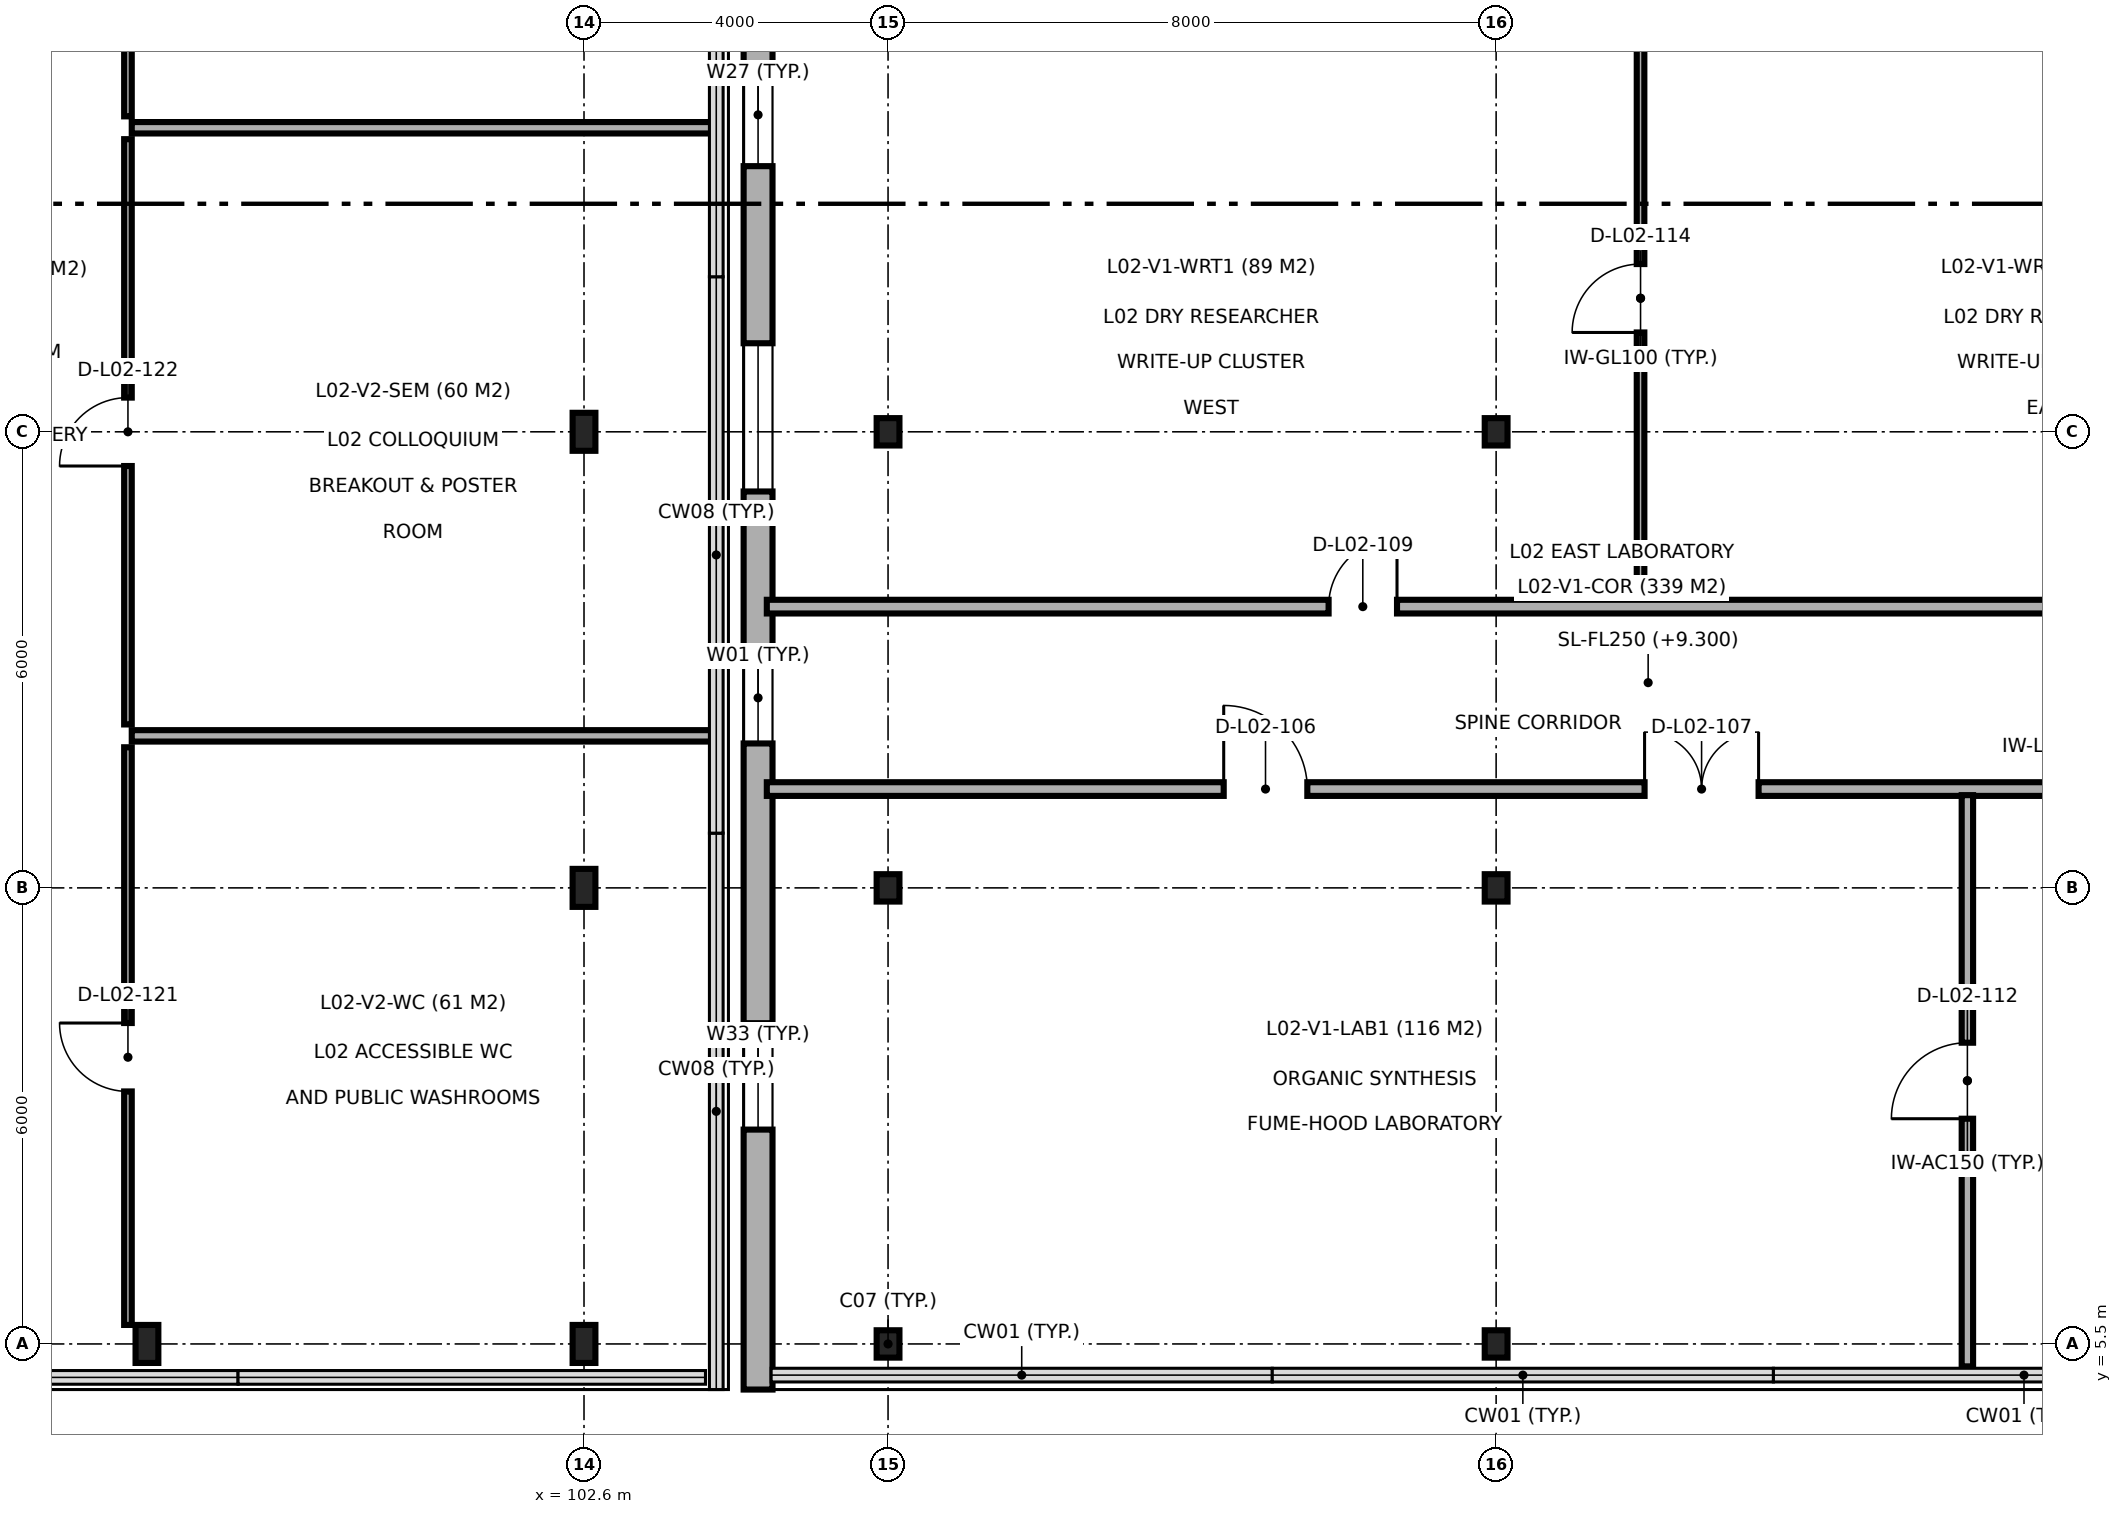
"""IFC4 building model, lengths in metres.
Left out: names, types, materials, properties, quantities, classifications, styles, units other than length and angle.
Written with IfcOpenShell. Run it as: python <this file> out.ifc"""

import sys

from ifc_helpers import new_model, si_unit, direction, frame, frame_2d, origin, origin_2d, place, context, subcontext, project, spatial, rectangle, i_section, extrude, element, fill, save


model = new_model("IFC4")
c1 = context("Model", 3, precision=1e-05, world=origin(), true_north=direction((0.0, 1.0)))
c2 = subcontext(c1, "Body", "Model", "MODEL_VIEW")
j1 = project(units=[si_unit("LENGTHUNIT", "METRE"), si_unit("PLANEANGLEUNIT", "RADIAN")], contexts=[c1])
p1 = place(None, origin())
s1 = spatial("IfcSite", under=j1, at=p1, CompositionType="ELEMENT")
p2 = place(p1, origin())
s2 = spatial("IfcBuilding", under=s1, at=p2, CompositionType="ELEMENT")
p3 = place(p2, frame((0.0, 0.0, 9.3)))
s3 = spatial("IfcBuildingStorey", under=s2, at=p3, CompositionType="ELEMENT", Elevation=9.3)
for number, where, z_axis, x_axis in (
    (1, (96.85, 5.5, 0.0), (0.0, 0.0, 1.0), (1.0, 0.0, 0.0)),
    (2, (102.6, 5.5, 0.0), (0.0, 0.0, 1.0), (1.0, 0.0, 0.0)),
    (3, (102.6, 11.5, 0.0), (0.0, 0.0, 1.0), (1.0, 0.0, 0.0)),
    (4, (102.6, 17.5, 0.0), (0.0, 0.0, 1.0), (1.0, 0.0, 0.0)),
):
    element("IfcColumn", number, at=place(p3, frame(where, z_axis=z_axis, x_axis=x_axis)), inside=s3, PredefinedType="COLUMN", context=c2, shape_type="SweptSolid", body=[
        extrude(i_section(OverallWidth=0.3, OverallDepth=0.5, WebThickness=0.014, FlangeThickness=0.028, FilletRadius=0.027, at=origin_2d()), origin(), (0.0, 0.0, 1.0), 4.5),
    ])
for number, where, z_axis, x_axis in (
    (5, (106.6, 5.5, 0.0), (0.0, 0.0, 1.0), (1.0, 0.0, 0.0)),
    (6, (106.6, 11.5, 0.0), (0.0, 0.0, 1.0), (1.0, 0.0, 0.0)),
    (7, (106.6, 17.5, 0.0), (0.0, 0.0, 1.0), (1.0, 0.0, 0.0)),
    (8, (114.6, 5.5, 0.0), (0.0, 0.0, 1.0), (1.0, 0.0, 0.0)),
    (9, (114.6, 11.5, 0.0), (0.0, 0.0, 1.0), (1.0, 0.0, 0.0)),
    (10, (114.6, 17.5, 0.0), (0.0, 0.0, 1.0), (1.0, 0.0, 0.0)),
):
    element("IfcColumn", number, at=place(p3, frame(where, z_axis=z_axis, x_axis=x_axis)), inside=s3, PredefinedType="COLUMN", context=c2, shape_type="SweptSolid", body=[
        extrude(i_section(OverallWidth=0.3, OverallDepth=0.36, WebThickness=0.012, FlangeThickness=0.022, FilletRadius=0.027, at=origin_2d()), origin(), (0.0, 0.0, 1.0), 4.5),
    ])
p4 = place(p3, frame((104.89, 23.5, 0.0), z_axis=(0.0, 0.0, 1.0), x_axis=(0.0, -1.0, 0.0)))
e11 = element("IfcWall", 11, at=p4, inside=s3, PredefinedType="SOLIDWALL", context=c2, shape_type="SweptSolid", body=[
    extrude(rectangle(XDim=18.6, YDim=0.38, at=frame_2d((9.3, 0.0))), origin(), (0.0, 0.0, 1.0), 4.25),
])
p5 = place(p4, frame((1.155, 0.0, 0.9)))
e12 = element("IfcOpeningElement", 12, at=p5, cuts=e11, PredefinedType="OPENING", context=c2, shape_type="SweptSolid", body=[
    extrude(rectangle(XDim=1.35, YDim=1.95, at=frame_2d((0.675, 0.975))), frame((0.0, 0.2, 0.0), z_axis=(0.0, -1.0, 0.0), x_axis=(1.0, 0.0, 0.0)), (0.0, 0.0, 1.0), 0.4),
])
p6 = place(p4, frame((4.835, 0.0, 0.9)))
e13 = element("IfcOpeningElement", 13, at=p6, cuts=e11, PredefinedType="OPENING", context=c2, shape_type="SweptSolid", body=[
    extrude(rectangle(XDim=1.95, YDim=1.95, at=frame_2d((0.975, 0.975))), frame((0.0, 0.2, 0.0), z_axis=(0.0, -1.0, 0.0), x_axis=(1.0, 0.0, 0.0)), (0.0, 0.0, 1.0), 0.4),
])
p7 = place(p4, frame((8.9, 0.0, 0.9)))
e14 = element("IfcOpeningElement", 14, at=p7, cuts=e11, PredefinedType="OPENING", context=c2, shape_type="SweptSolid", body=[
    extrude(rectangle(XDim=1.2, YDim=1.8, at=frame_2d((0.6, 0.9))), frame((0.0, 0.2, 0.0), z_axis=(0.0, -1.0, 0.0), x_axis=(1.0, 0.0, 0.0)), (0.0, 0.0, 1.0), 0.4),
])
p8 = place(p4, frame((13.78, 0.0, 0.9)))
e15 = element("IfcOpeningElement", 15, at=p8, cuts=e11, PredefinedType="OPENING", context=c2, shape_type="SweptSolid", body=[
    extrude(rectangle(XDim=1.4, YDim=1.65, at=frame_2d((0.7, 0.825))), frame((0.0, 0.2, 0.0), z_axis=(0.0, -1.0, 0.0), x_axis=(1.0, 0.0, 0.0)), (0.0, 0.0, 1.0), 0.4),
])
p9 = place(p3, frame((105.005, 12.8, 0.0), z_axis=(0.0, 0.0, 1.0), x_axis=(1.0, 0.0, 0.0)))
e16 = element("IfcWall", 16, at=p9, inside=s3, PredefinedType="PARTITIONING", context=c2, shape_type="SweptSolid", body=[
    extrude(rectangle(XDim=34.495, YDim=0.18, at=frame_2d((17.248, 0.0))), origin(), (0.0, 0.0, 1.0), 4.25),
])
p10 = place(p9, frame((6.011, 0.0, 0.0)))
e17 = element("IfcOpeningElement", 17, at=p10, cuts=e16, PredefinedType="OPENING", context=c2, shape_type="SweptSolid", body=[
    extrude(rectangle(XDim=1.1, YDim=2.15, at=frame_2d((0.55, 1.075))), frame((0.0, 0.1, 0.0), z_axis=(0.0, -1.0, 0.0), x_axis=(1.0, 0.0, 0.0)), (0.0, 0.0, 1.0), 0.2),
])
p11 = place(p9, frame((11.548, 0.0, 0.0)))
e18 = element("IfcOpeningElement", 18, at=p11, cuts=e16, PredefinedType="OPENING", context=c2, shape_type="SweptSolid", body=[
    extrude(rectangle(XDim=1.5, YDim=2.2, at=frame_2d((0.75, 1.1))), frame((0.0, 0.1, 0.0), z_axis=(0.0, -1.0, 0.0), x_axis=(1.0, 0.0, 0.0)), (0.0, 0.0, 1.0), 0.2),
])
p12 = place(p9, frame((27.548, 0.0, 0.0)))
e19 = element("IfcOpeningElement", 19, at=p12, cuts=e16, PredefinedType="OPENING", context=c2, shape_type="SweptSolid", body=[
    extrude(rectangle(XDim=0.9, YDim=2.1, at=frame_2d((0.45, 1.05))), frame((0.0, 0.1, 0.0), z_axis=(0.0, -1.0, 0.0), x_axis=(1.0, 0.0, 0.0)), (0.0, 0.0, 1.0), 0.2),
])
p13 = place(p3, frame((105.005, 15.2, 0.0), z_axis=(0.0, 0.0, 1.0), x_axis=(1.0, 0.0, 0.0)))
e20 = element("IfcWall", 20, at=p13, inside=s3, PredefinedType="PARTITIONING", context=c2, shape_type="SweptSolid", body=[
    extrude(rectangle(XDim=34.495, YDim=0.18, at=frame_2d((17.248, 0.0))), origin(), (0.0, 0.0, 1.0), 4.25),
])
p14 = place(p13, frame((7.391, 0.0, 0.0)))
e21 = element("IfcOpeningElement", 21, at=p14, cuts=e20, PredefinedType="OPENING", context=c2, shape_type="SweptSolid", body=[
    extrude(rectangle(XDim=0.9, YDim=2.1, at=frame_2d((0.45, 1.05))), frame((0.0, 0.1, 0.0), z_axis=(0.0, -1.0, 0.0), x_axis=(1.0, 0.0, 0.0)), (0.0, 0.0, 1.0), 0.2),
])
p15 = place(p13, frame((18.45, 0.0, 0.0)))
e22 = element("IfcOpeningElement", 22, at=p15, cuts=e20, PredefinedType="OPENING", context=c2, shape_type="SweptSolid", body=[
    extrude(rectangle(XDim=0.95, YDim=2.1, at=frame_2d((0.475, 1.05))), frame((0.0, 0.1, 0.0), z_axis=(0.0, -1.0, 0.0), x_axis=(1.0, 0.0, 0.0)), (0.0, 0.0, 1.0), 0.2),
])
p16 = place(p13, frame((27.466, 0.0, 0.0)))
e23 = element("IfcOpeningElement", 23, at=p16, cuts=e20, PredefinedType="OPENING", context=c2, shape_type="SweptSolid", body=[
    extrude(rectangle(XDim=1.0, YDim=2.15, at=frame_2d((0.5, 1.075))), frame((0.0, 0.1, 0.0), z_axis=(0.0, -1.0, 0.0), x_axis=(1.0, 0.0, 0.0)), (0.0, 0.0, 1.0), 0.2),
])
p17 = place(p3, frame((120.8, 5.205, 0.0), z_axis=(0.0, 0.0, 1.0), x_axis=(0.0, 1.0, 0.0)))
e24 = element("IfcWall", 24, at=p17, inside=s3, PredefinedType="PARTITIONING", context=c2, shape_type="SweptSolid", body=[
    extrude(rectangle(XDim=7.515, YDim=0.15, at=frame_2d((3.757, 0.0))), origin(), (0.0, 0.0, 1.0), 4.25),
])
p18 = place(p17, frame((3.258, 0.0, 0.0)))
e25 = element("IfcOpeningElement", 25, at=p18, cuts=e24, PredefinedType="OPENING", context=c2, shape_type="SweptSolid", body=[
    extrude(rectangle(XDim=1.0, YDim=2.15, at=frame_2d((0.5, 1.075))), frame((0.0, 0.085, 0.0), z_axis=(0.0, -1.0, 0.0), x_axis=(1.0, 0.0, 0.0)), (0.0, 0.0, 1.0), 0.17),
])
p19 = place(p3, frame((116.5, 15.32, 0.0), z_axis=(0.0, 0.0, 1.0), x_axis=(0.0, 1.0, 0.0)))
e26 = element("IfcWall", 26, at=p19, inside=s3, PredefinedType="PARTITIONING", context=c2, shape_type="SweptSolid", body=[
    extrude(rectangle(XDim=7.875, YDim=0.1, at=frame_2d((3.938, 0.0))), origin(), (0.0, 0.0, 1.0), 4.25),
])
p20 = place(p19, frame((3.487, 0.0, 0.0)))
e27 = element("IfcOpeningElement", 27, at=p20, cuts=e26, PredefinedType="OPENING", context=c2, shape_type="SweptSolid", body=[
    extrude(rectangle(XDim=0.9, YDim=2.1, at=frame_2d((0.45, 1.05))), frame((0.0, 0.06, 0.0), z_axis=(0.0, -1.0, 0.0), x_axis=(1.0, 0.0, 0.0)), (0.0, 0.0, 1.0), 0.12),
])
for number, where, z_axis, x_axis in (
    (28, (96.65, 13.5, 0.0), (0.0, 0.0, 1.0), (1.0, 0.0, 0.0)),
    (29, (96.65, 21.5, 0.0), (0.0, 0.0, 1.0), (1.0, 0.0, 0.0)),
):
    element("IfcWall", number, at=place(p3, frame(where, z_axis=z_axis, x_axis=x_axis)), inside=s3, PredefinedType="PARTITIONING", context=c2, shape_type="SweptSolid", body=[
        extrude(rectangle(XDim=7.63, YDim=0.15, at=frame_2d((3.815, 0.0))), origin(), (0.0, 0.0, 1.0), 4.25),
    ])
p21 = place(p3, frame((96.6, 5.75, 0.0), z_axis=(0.0, 0.0, 1.0), x_axis=(0.0, 1.0, 0.0)))
e30 = element("IfcWall", 30, at=p21, inside=s3, PredefinedType="PARTITIONING", context=c2, shape_type="SweptSolid", body=[
    extrude(rectangle(XDim=7.6, YDim=0.1, at=frame_2d((3.8, 0.0))), origin(), (0.0, 0.0, 1.0), 4.25),
])
p22 = place(p21, frame((3.072, 0.0, 0.0)))
e31 = element("IfcOpeningElement", 31, at=p22, cuts=e30, PredefinedType="OPENING", context=c2, shape_type="SweptSolid", body=[
    extrude(rectangle(XDim=0.9, YDim=2.1, at=frame_2d((0.45, 1.05))), frame((0.0, 0.06, 0.0), z_axis=(0.0, -1.0, 0.0), x_axis=(1.0, 0.0, 0.0)), (0.0, 0.0, 1.0), 0.12),
])
p23 = place(p3, frame((96.6, 13.65, 0.0), z_axis=(0.0, 0.0, 1.0), x_axis=(0.0, 1.0, 0.0)))
e32 = element("IfcWall", 32, at=p23, inside=s3, PredefinedType="PARTITIONING", context=c2, shape_type="SweptSolid", body=[
    extrude(rectangle(XDim=7.7, YDim=0.1, at=frame_2d((3.85, 0.0))), origin(), (0.0, 0.0, 1.0), 4.25),
])
p24 = place(p23, frame((3.4, 0.0, 0.0)))
e33 = element("IfcOpeningElement", 33, at=p24, cuts=e32, PredefinedType="OPENING", context=c2, shape_type="SweptSolid", body=[
    extrude(rectangle(XDim=0.9, YDim=2.1, at=frame_2d((0.45, 1.05))), frame((0.0, 0.06, 0.0), z_axis=(0.0, -1.0, 0.0), x_axis=(1.0, 0.0, 0.0)), (0.0, 0.0, 1.0), 0.12),
])
p25 = place(p3, frame((96.6, 21.65, 0.0), z_axis=(0.0, 0.0, 1.0), x_axis=(0.0, 1.0, 0.0)))
e34 = element("IfcWall", 34, at=p25, inside=s3, PredefinedType="PARTITIONING", context=c2, shape_type="SweptSolid", body=[
    extrude(rectangle(XDim=19.6, YDim=0.1, at=frame_2d((9.8, 0.0))), origin(), (0.0, 0.0, 1.0), 4.25),
])
p26 = place(p25, frame((9.339, 0.0, 0.0)))
e35 = element("IfcOpeningElement", 35, at=p26, cuts=e34, PredefinedType="OPENING", context=c2, shape_type="SweptSolid", body=[
    extrude(rectangle(XDim=0.95, YDim=2.1, at=frame_2d((0.475, 1.05))), frame((0.0, 0.06, 0.0), z_axis=(0.0, -1.0, 0.0), x_axis=(1.0, 0.0, 0.0)), (0.0, 0.0, 1.0), 0.12),
])
p27 = place(p5, origin())
e36 = element("IfcWindow", 36, at=p27, inside=s3, PartitioningType="SINGLE_PANEL", PredefinedType="WINDOW", context=c2, shape_type="SweptSolid", body=[
    extrude(rectangle(XDim=1.35, YDim=1.95, at=frame_2d((0.675, 0.975))), frame((0.0, 0.03, 0.0), z_axis=(0.0, -1.0, 0.0), x_axis=(1.0, 0.0, 0.0)), (0.0, 0.0, 1.0), 0.06),
])
fill(e12, e36)
p28 = place(p6, origin())
e37 = element("IfcWindow", 37, at=p28, inside=s3, PartitioningType="SINGLE_PANEL", PredefinedType="WINDOW", context=c2, shape_type="SweptSolid", body=[
    extrude(rectangle(XDim=1.95, YDim=1.95, at=frame_2d((0.975, 0.975))), frame((0.0, 0.03, 0.0), z_axis=(0.0, -1.0, 0.0), x_axis=(1.0, 0.0, 0.0)), (0.0, 0.0, 1.0), 0.06),
])
fill(e13, e37)
p29 = place(p7, origin())
e38 = element("IfcWindow", 38, at=p29, inside=s3, PartitioningType="SINGLE_PANEL", PredefinedType="WINDOW", context=c2, shape_type="SweptSolid", body=[
    extrude(rectangle(XDim=1.2, YDim=1.8, at=frame_2d((0.6, 0.9))), frame((0.0, 0.03, 0.0), z_axis=(0.0, -1.0, 0.0), x_axis=(1.0, 0.0, 0.0)), (0.0, 0.0, 1.0), 0.06),
])
fill(e14, e38)
p30 = place(p8, origin())
e39 = element("IfcWindow", 39, at=p30, inside=s3, PartitioningType="SINGLE_PANEL", PredefinedType="WINDOW", context=c2, shape_type="SweptSolid", body=[
    extrude(rectangle(XDim=1.4, YDim=1.65, at=frame_2d((0.7, 0.825))), frame((0.0, 0.03, 0.0), z_axis=(0.0, -1.0, 0.0), x_axis=(1.0, 0.0, 0.0)), (0.0, 0.0, 1.0), 0.06),
])
fill(e15, e39)
p31 = place(p10, origin())
e40 = element("IfcDoor", 40, at=p31, inside=s3, OperationType="SINGLE_SWING_LEFT", PredefinedType="DOOR", context=c2, shape_type="SweptSolid", body=[
    extrude(rectangle(XDim=1.1, YDim=2.15, at=frame_2d((0.55, 1.075))), frame((0.0, 0.025, 0.0), z_axis=(0.0, -1.0, 0.0), x_axis=(1.0, 0.0, 0.0)), (0.0, 0.0, 1.0), 0.05),
])
fill(e17, e40)
p32 = place(p11, origin())
e41 = element("IfcDoor", 41, at=p32, inside=s3, OperationType="DOUBLE_DOOR_SINGLE_SWING", PredefinedType="DOOR", context=c2, shape_type="SweptSolid", body=[
    extrude(rectangle(XDim=1.5, YDim=2.2, at=frame_2d((0.75, 1.1))), frame((0.0, 0.025, 0.0), z_axis=(0.0, -1.0, 0.0), x_axis=(1.0, 0.0, 0.0)), (0.0, 0.0, 1.0), 0.05),
])
fill(e18, e41)
p33 = place(p14, origin())
e42 = element("IfcDoor", 42, at=p33, inside=s3, OperationType="SINGLE_SWING_RIGHT", PredefinedType="DOOR", context=c2, shape_type="SweptSolid", body=[
    extrude(rectangle(XDim=0.9, YDim=2.1, at=frame_2d((0.45, 1.05))), frame((0.0, 0.025, 0.0), z_axis=(0.0, -1.0, 0.0), x_axis=(1.0, 0.0, 0.0)), (0.0, 0.0, 1.0), 0.05),
])
fill(e21, e42)
p34 = place(p18, origin())
e43 = element("IfcDoor", 43, at=p34, inside=s3, OperationType="SINGLE_SWING_LEFT", PredefinedType="DOOR", context=c2, shape_type="SweptSolid", body=[
    extrude(rectangle(XDim=1.0, YDim=2.15, at=frame_2d((0.5, 1.075))), frame((0.0, 0.025, 0.0), z_axis=(0.0, -1.0, 0.0), x_axis=(1.0, 0.0, 0.0)), (0.0, 0.0, 1.0), 0.05),
])
fill(e25, e43)
p35 = place(p20, origin())
e44 = element("IfcDoor", 44, at=p35, inside=s3, OperationType="SINGLE_SWING_LEFT", PredefinedType="DOOR", context=c2, shape_type="SweptSolid", body=[
    extrude(rectangle(XDim=0.9, YDim=2.1, at=frame_2d((0.45, 1.05))), frame((0.0, 0.025, 0.0), z_axis=(0.0, -1.0, 0.0), x_axis=(1.0, 0.0, 0.0)), (0.0, 0.0, 1.0), 0.05),
])
fill(e27, e44)
p36 = place(p22, origin())
e45 = element("IfcDoor", 45, at=p36, inside=s3, OperationType="SINGLE_SWING_RIGHT", PredefinedType="DOOR", context=c2, shape_type="SweptSolid", body=[
    extrude(rectangle(XDim=0.9, YDim=2.1, at=frame_2d((0.45, 1.05))), frame((0.0, 0.025, 0.0), z_axis=(0.0, -1.0, 0.0), x_axis=(1.0, 0.0, 0.0)), (0.0, 0.0, 1.0), 0.05),
])
fill(e31, e45)
p37 = place(p24, origin())
e46 = element("IfcDoor", 46, at=p37, inside=s3, OperationType="SINGLE_SWING_LEFT", PredefinedType="DOOR", context=c2, shape_type="SweptSolid", body=[
    extrude(rectangle(XDim=0.9, YDim=2.1, at=frame_2d((0.45, 1.05))), frame((0.0, 0.025, 0.0), z_axis=(0.0, -1.0, 0.0), x_axis=(1.0, 0.0, 0.0)), (0.0, 0.0, 1.0), 0.05),
])
fill(e33, e46)
save(model, sys.argv[1])
